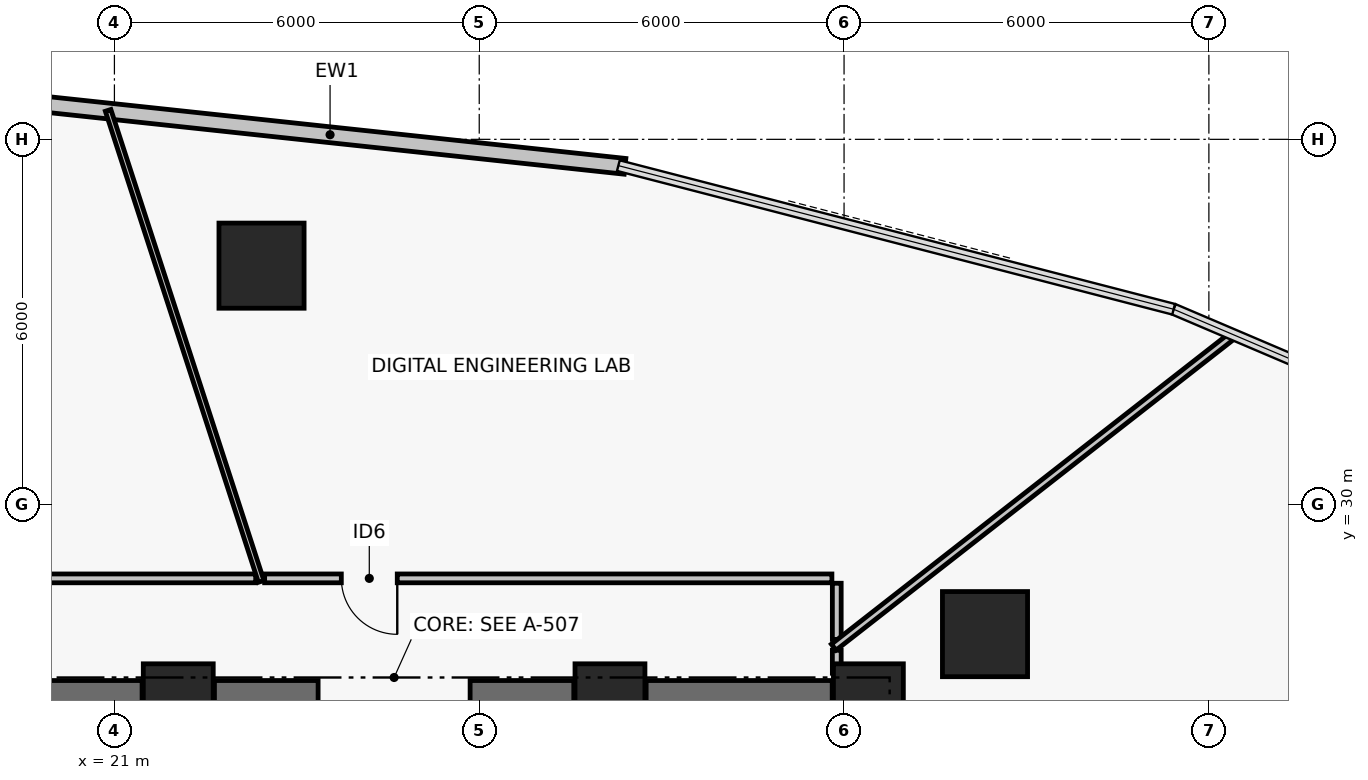
"""IFC4 building model, lengths in metres.
Left out: names, types, materials, properties, quantities, classifications, styles, units other than length and angle.
Written with IfcOpenShell. Run it as: python <this file> out.ifc"""

import sys

from ifc_helpers import new_model, si_unit, direction, frame, frame_2d, origin, origin_2d, place, context, subcontext, project, spatial, rectangle, hollow_rectangle, extrude, element, fill, save


model = new_model("IFC4")
c1 = context("Model", 3, precision=1e-05, world=origin(), true_north=direction((0.0, 1.0)))
c2 = subcontext(c1, "Body", "Model", "MODEL_VIEW")
j1 = project(units=[si_unit("LENGTHUNIT", "METRE"), si_unit("PLANEANGLEUNIT", "RADIAN")], contexts=[c1])
p1 = place(None, origin())
s1 = spatial("IfcSite", under=j1, at=p1, CompositionType="ELEMENT")
p2 = place(p1, origin())
s2 = spatial("IfcBuilding", under=s1, at=p2, CompositionType="ELEMENT")
p3 = place(p2, frame((0.0, 0.0, 57.36)))
s3 = spatial("IfcBuildingStorey", under=s2, at=p3, CompositionType="ELEMENT", Elevation=57.36)
for number, where, z_axis, x_axis in (
    (1, (22.05, 26.8, 0.0), (0.0, 0.0, 1.0), (1.0, 0.0, 0.0)),
    (2, (29.15, 26.8, 0.0), (0.0, 0.0, 1.0), (1.0, 0.0, 0.0)),
    (3, (33.4, 26.8, 0.0), (0.0, 0.0, 1.0), (1.0, 0.0, 0.0)),
):
    element("IfcColumn", number, at=place(p3, frame(where, z_axis=z_axis, x_axis=x_axis)), inside=s3, PredefinedType="COLUMN", context=c2, shape_type="SweptSolid", body=[
        extrude(rectangle(XDim=1.15, YDim=1.15, at=origin_2d()), origin(), (0.0, 0.0, 1.0), 3.72),
    ])
p4 = place(p3, frame((18.395, 26.8, 0.0), z_axis=(0.0, 0.0, 1.0), x_axis=(1.0, 0.0, 0.0)))
e4 = element("IfcWall", 4, at=p4, inside=s3, PredefinedType="SHEAR", context=c2, shape_type="SweptSolid", body=[
    extrude(rectangle(XDim=3.06, YDim=0.6, at=frame_2d((1.53, 0.0))), origin(), (0.0, 0.0, 1.0), 3.47),
])
p5 = place(p3, frame((22.645, 26.8, 0.0), z_axis=(0.0, 0.0, 1.0), x_axis=(1.0, 0.0, 0.0)))
e5 = element("IfcWall", 5, at=p5, inside=s3, PredefinedType="SHEAR", context=c2, shape_type="SweptSolid", body=[
    extrude(rectangle(XDim=1.705, YDim=0.6, at=frame_2d((0.853, 0.0))), origin(), (0.0, 0.0, 1.0), 3.47),
])
p6 = place(p3, frame((26.85, 26.8, 0.0), z_axis=(0.0, 0.0, 1.0), x_axis=(1.0, 0.0, 0.0)))
e6 = element("IfcWall", 6, at=p6, inside=s3, PredefinedType="SHEAR", context=c2, shape_type="SweptSolid", body=[
    extrude(rectangle(XDim=1.705, YDim=0.6, at=frame_2d((0.853, 0.0))), origin(), (0.0, 0.0, 1.0), 3.47),
])
p7 = place(p3, frame((29.745, 26.8, 0.0), z_axis=(0.0, 0.0, 1.0), x_axis=(1.0, 0.0, 0.0)))
e7 = element("IfcWall", 7, at=p7, inside=s3, PredefinedType="SHEAR", context=c2, shape_type="SweptSolid", body=[
    extrude(rectangle(XDim=3.06, YDim=0.6, at=frame_2d((1.53, 0.0))), origin(), (0.0, 0.0, 1.0), 3.47),
])
for number, where, z_axis, x_axis in (
    (8, (35.318, 27.863, 0.0), (0.0, 0.0, 1.0), (1.0, 0.0, 0.0)),
    (9, (23.419, 33.923, 0.0), (0.0, 0.0, 1.0), (1.0, 0.0, 0.0)),
):
    element("IfcColumn", number, at=place(p3, frame(where, z_axis=z_axis, x_axis=x_axis)), inside=s3, PredefinedType="COLUMN", context=c2, shape_type="SweptSolid", body=[
        extrude(hollow_rectangle(XDim=1.4, YDim=1.4, WallThickness=0.055, at=origin_2d()), origin(), (0.0, 0.0, 1.0), 3.72),
    ])
p8 = place(p3, frame((19.696, 36.595, 0.0), z_axis=(0.0, 0.0, 1.0), x_axis=(0.994319088673, -0.106440358419, 0.0)))
e10 = element("IfcWall", 10, at=p8, inside=s3, PredefinedType="PARTITIONING", context=c2, shape_type="SweptSolid", body=[
    extrude(rectangle(XDim=9.757, YDim=0.26, at=frame_2d((4.879, 0.0))), origin(), (0.0, 0.0, 1.0), 3.47),
])
p9 = place(p3, frame((33.74, 27.22, 0.0), z_axis=(0.0, 0.0, 1.0), x_axis=(-1.0, 0.0, 0.0)))
e11 = element("IfcWall", 11, at=p9, inside=s3, PredefinedType="PARTITIONING", context=c2, shape_type="SweptSolid", body=[
    extrude(rectangle(XDim=0.86, YDim=0.145, at=frame_2d((0.43, 0.0))), origin(), (0.0, 0.0, 1.0), 2.6),
])
p10 = place(p3, frame((32.88, 27.22, 0.0), z_axis=(0.0, 0.0, 1.0), x_axis=(0.0, 1.0, 0.0)))
e12 = element("IfcWall", 12, at=p10, inside=s3, PredefinedType="PARTITIONING", context=c2, shape_type="SweptSolid", body=[
    extrude(rectangle(XDim=0.379, YDim=0.145, at=frame_2d((0.189, 0.0))), origin(), (0.0, 0.0, 1.0), 2.6),
])
p11 = place(p3, frame((32.88, 27.777, 0.0), z_axis=(0.0, 0.0, 1.0), x_axis=(0.0, 1.0, 0.0)))
e13 = element("IfcWall", 13, at=p11, inside=s3, PredefinedType="PARTITIONING", context=c2, shape_type="SweptSolid", body=[
    extrude(rectangle(XDim=0.923, YDim=0.145, at=frame_2d((0.462, 0.0))), origin(), (0.0, 0.0, 1.0), 3.0),
])
p12 = place(p3, frame((32.8, 28.78, 0.0), z_axis=(0.0, 0.0, 1.0), x_axis=(-1.0, 0.0, 0.0)))
e14 = element("IfcWall", 14, at=p12, inside=s3, PredefinedType="PARTITIONING", context=c2, shape_type="SweptSolid", body=[
    extrude(rectangle(XDim=9.329, YDim=0.145, at=frame_2d((4.665, 0.0))), origin(), (0.0, 0.0, 1.0), 3.0),
])
p13 = place(p12, frame((7.148, 0.0, 0.0)))
e15 = element("IfcOpeningElement", 15, at=p13, cuts=e14, PredefinedType="OPENING", context=c2, shape_type="SweptSolid", body=[
    extrude(rectangle(XDim=0.92, YDim=2.05, at=frame_2d((0.46, 1.025))), frame((0.0, 0.083, 0.0), z_axis=(0.0, -1.0, 0.0), x_axis=(1.0, 0.0, 0.0)), (0.0, 0.0, 1.0), 0.165),
])
p14 = place(p3, frame((23.323, 28.78, 0.0), z_axis=(0.0, 0.0, 1.0), x_axis=(-1.0, 0.0, 0.0)))
e16 = element("IfcWall", 16, at=p14, inside=s3, PredefinedType="PARTITIONING", context=c2, shape_type="SweptSolid", body=[
    extrude(rectangle(XDim=7.424, YDim=0.145, at=frame_2d((3.712, 0.0))), origin(), (0.0, 0.0, 1.0), 2.6),
])
p15 = place(p3, frame((32.83, 27.649, 0.0), z_axis=(0.0, 0.0, 1.0), x_axis=(0.78800045327, 0.615674658928, 0.0)))
e17 = element("IfcWall", 17, at=p15, inside=s3, PredefinedType="PARTITIONING", context=c2, shape_type="SweptSolid", body=[
    extrude(rectangle(XDim=8.356, YDim=0.125, at=frame_2d((4.178, 0.0))), origin(), (0.0, 0.0, 1.0), 2.85),
])
p16 = place(p3, frame((23.413, 28.73, 0.0), z_axis=(0.0, 0.0, 1.0), x_axis=(-0.309033883912, 0.951051028386, 0.0)))
e18 = element("IfcWall", 18, at=p16, inside=s3, PredefinedType="PARTITIONING", context=c2, shape_type="SweptSolid", body=[
    extrude(rectangle(XDim=8.145, YDim=0.095, at=frame_2d((4.073, 0.0))), origin(), (0.0, 0.0, 1.0), 2.6),
])
p17 = place(p13, origin())
e19 = element("IfcDoor", 19, at=p17, inside=s3, OperationType="SINGLE_SWING_LEFT", PredefinedType="DOOR", context=c2, shape_type="SweptSolid", body=[
    extrude(rectangle(XDim=0.92, YDim=2.05, at=frame_2d((0.46, 1.025))), frame((0.0, 0.025, 0.0), z_axis=(0.0, -1.0, 0.0), x_axis=(1.0, 0.0, 0.0)), (0.0, 0.0, 1.0), 0.05),
])
fill(e15, e19)
save(model, sys.argv[1])
